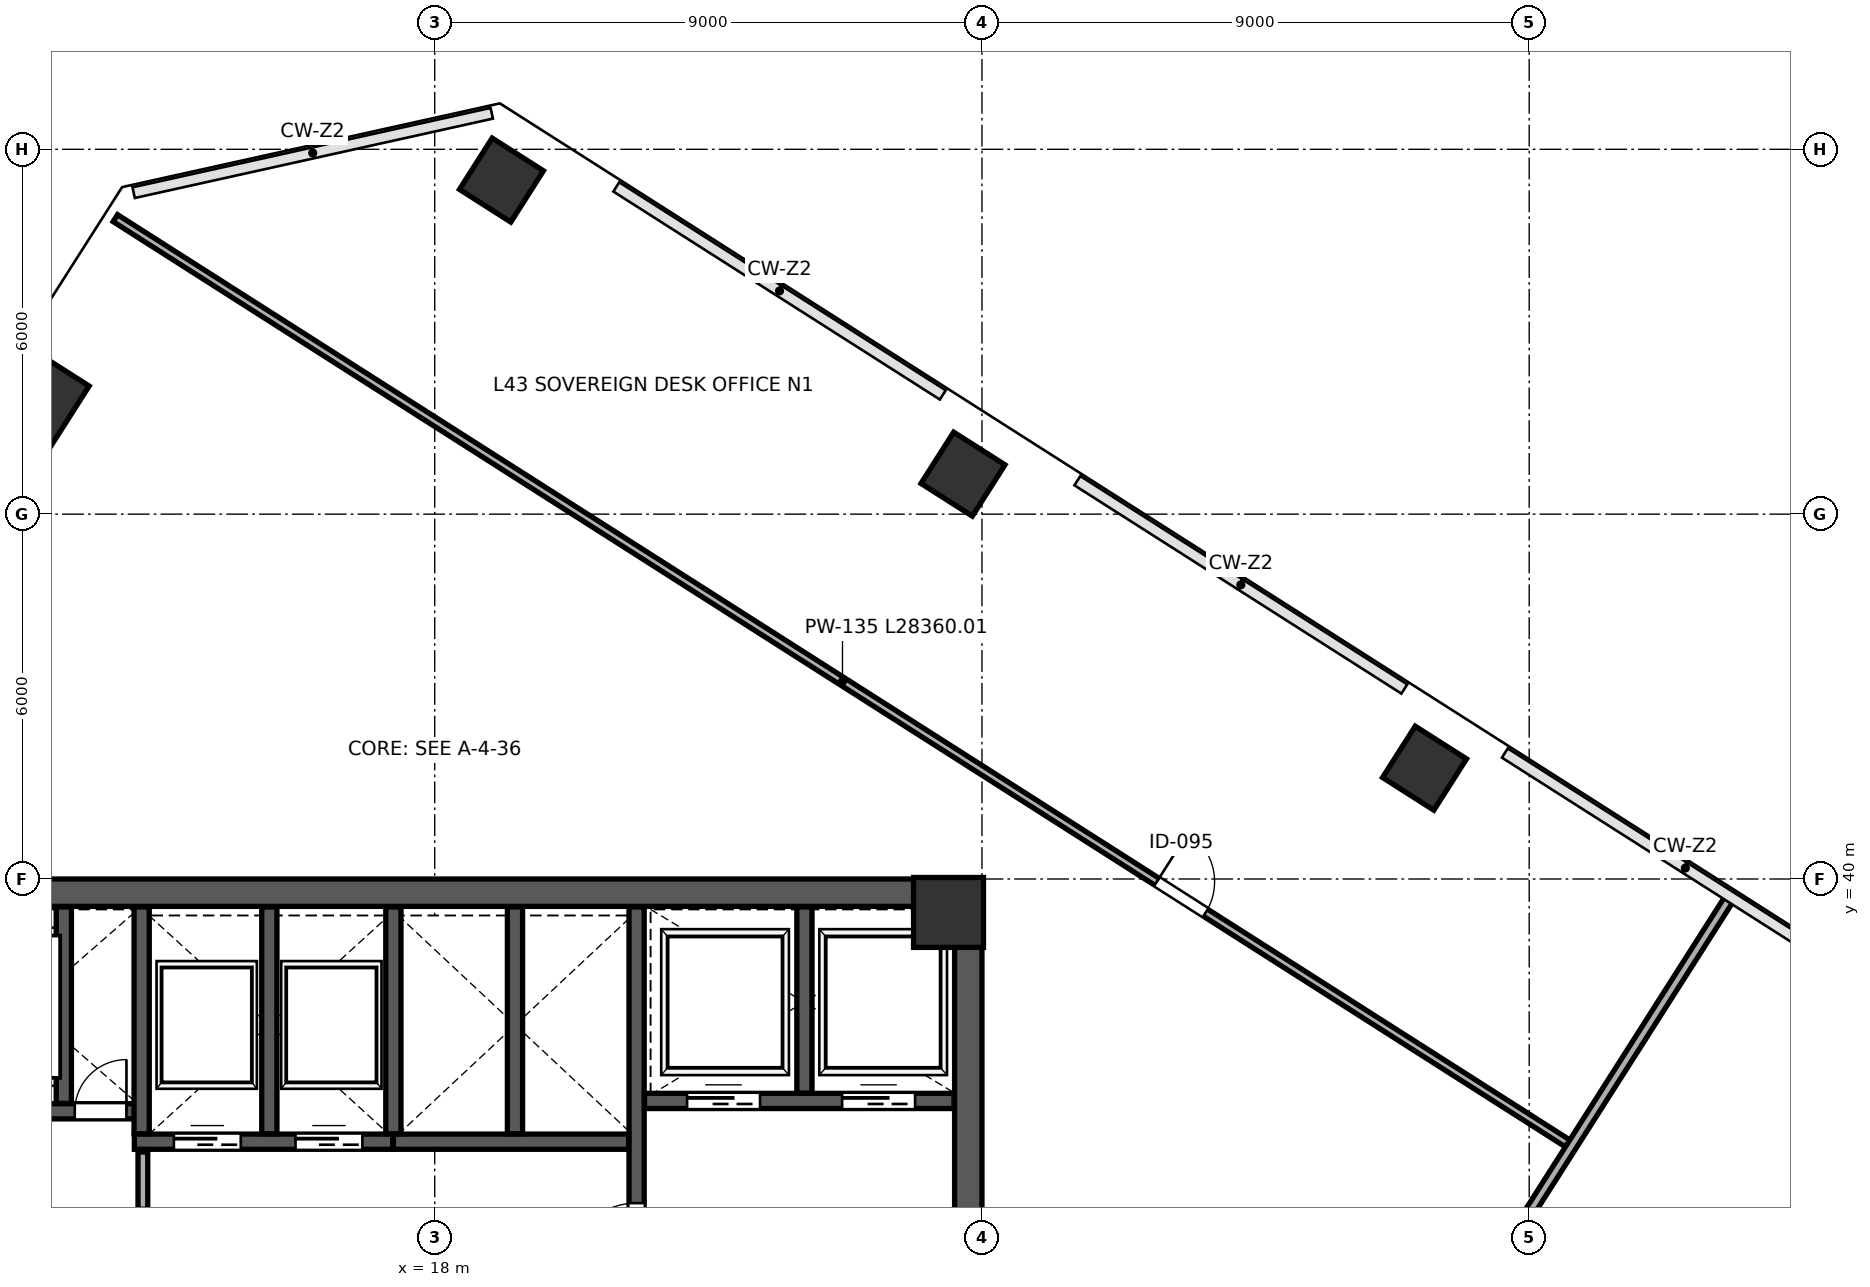
"""IFC4 building model, lengths in metres.
Left out: names, types, materials, properties, quantities, classifications, styles, units other than length and angle.
Written with IfcOpenShell. Run it as: python <this file> out.ifc"""

import sys

from ifc_helpers import new_model, si_unit, direction, frame, frame_2d, origin, origin_2d, place, context, subcontext, project, spatial, rectangle, extrude, clip, halfspace, source, transform, mapped, element, fill, save


model = new_model("IFC4")
c1 = context("Model", 3, precision=1e-05, world=origin(), true_north=direction((0.0, 1.0)))
c2 = subcontext(c1, "Body", "Model", "MODEL_VIEW")
j1 = project(units=[si_unit("LENGTHUNIT", "METRE"), si_unit("PLANEANGLEUNIT", "RADIAN")], contexts=[c1])
p1 = place(None, origin())
s1 = spatial("IfcSite", under=j1, at=p1, CompositionType="ELEMENT")
p2 = place(p1, origin())
s2 = spatial("IfcBuilding", under=s1, at=p2, CompositionType="ELEMENT")
p3 = place(p2, frame((0.0, 0.0, 191.8)))
s3 = spatial("IfcBuildingStorey", under=s2, at=p3, CompositionType="ELEMENT", Elevation=191.8)
m1 = source(origin(), c2, "Body", "SweptSolid", [
    extrude(rectangle(XDim=1.15, YDim=1.15, at=origin_2d()), origin(), (0.0, 0.0, 1.0), 4.198),
])
p4 = place(p3, frame((26.45, 39.45, 0.001), z_axis=(0.0, 0.0, 1.0), x_axis=(1.0, 0.0, 0.0)))
e1 = element("IfcColumn", 1, at=p4, inside=s3, PredefinedType="COLUMN", context=c2, shape_type="MappedRepresentation", body=[
    mapped(m1, transform((0.0, 0.0, 0.0), scale=1.0)),
])
p5 = place(p3, frame((19.098, 51.494, 0.0), z_axis=(0.198890629471, 0.020105496049, 0.979815434935), x_axis=(-0.438960395993, -0.892063444469, 0.107408481004)))
e2 = element("IfcColumn", 2, at=p5, inside=s3, PredefinedType="COLUMN", context=c2, shape_type="Clipping", body=[
    clip(clip(extrude(rectangle(XDim=1.0, YDim=1.0, at=origin_2d()), origin(), (0.0, 0.0, 1.0), 4.286), halfspace(frame((0.0, 0.0, 0.142), z_axis=(0.0, 0.0, -1.0), x_axis=(1.0, 0.0, 0.0)), False)), halfspace(frame((0.0, 0.0, 4.145), z_axis=(0.0, 0.0, 1.0), x_axis=(1.0, 0.0, 0.0)), False)),
])
p6 = place(p3, frame((26.688, 46.658, 0.0), z_axis=(0.14914476181, -0.05646727419, 0.98720174583), x_axis=(-0.794687285195, -0.600940867907, 0.085686591885)))
e3 = element("IfcColumn", 3, at=p6, inside=s3, PredefinedType="COLUMN", context=c2, shape_type="Clipping", body=[
    clip(clip(extrude(rectangle(XDim=1.0, YDim=1.0, at=origin_2d()), origin(), (0.0, 0.0, 1.0), 4.254), halfspace(frame((0.0, 0.0, 0.112), z_axis=(0.0, 0.0, -1.0), x_axis=(1.0, 0.0, 0.0)), False)), halfspace(frame((0.0, 0.0, 4.142), z_axis=(0.0, 0.0, 1.0), x_axis=(1.0, 0.0, 0.0)), False)),
])
p7 = place(p3, frame((34.279, 41.822, 0.0), z_axis=(0.09775031646, -0.133066559826, 0.986274893875), x_axis=(-0.993434538691, -0.072232782497, 0.088714387043)))
e4 = element("IfcColumn", 4, at=p7, inside=s3, PredefinedType="COLUMN", context=c2, shape_type="Clipping", body=[
    clip(clip(extrude(rectangle(XDim=1.0, YDim=1.0, at=origin_2d()), origin(), (0.0, 0.0, 1.0), 4.258), halfspace(frame((0.0, 0.0, 0.116), z_axis=(0.0, 0.0, -1.0), x_axis=(1.0, 0.0, 0.0)), False)), halfspace(frame((0.0, 0.0, 4.142), z_axis=(0.0, 0.0, 1.0), x_axis=(1.0, 0.0, 0.0)), False)),
])
p8 = place(p3, frame((11.587, 47.801, 0.0), z_axis=(0.163271900123, 0.097586490462, 0.981742921293), x_axis=(-0.020086457797, -0.994560936836, 0.102201160132)))
e5 = element("IfcColumn", 5, at=p8, inside=s3, PredefinedType="PILASTER", context=c2, shape_type="Clipping", body=[
    clip(clip(extrude(rectangle(XDim=0.9, YDim=1.3, at=origin_2d()), origin(), (0.0, 0.0, 1.0), 4.278), halfspace(frame((0.0, 0.0, 0.154), z_axis=(0.0, 0.0, -1.0), x_axis=(1.0, 0.0, 0.0)), False)), halfspace(frame((0.0, 0.0, 4.124), z_axis=(0.0, 0.0, 1.0), x_axis=(1.0, 0.0, 0.0)), False)),
])
p9 = place(p3, frame((26.775, 24.45, 0.0), z_axis=(0.0, 0.0, 1.0), x_axis=(0.0, 1.0, 0.0)))
e6 = element("IfcWall", 6, at=p9, inside=s3, PredefinedType="SHEAR", context=c2, shape_type="SweptSolid", body=[
    extrude(rectangle(XDim=15.1, YDim=0.45, at=frame_2d((7.55, 0.0))), origin(), (0.0, 0.0, 1.0), 3.96),
])
p10 = place(p9, frame((8.6, 0.0, 0.0)))
e7 = element("IfcOpeningElement", 7, at=p10, cuts=e6, PredefinedType="OPENING", context=c2, shape_type="SweptSolid", body=[
    extrude(rectangle(XDim=1.15, YDim=2.2, at=frame_2d((0.575, 1.1))), frame((0.0, 0.235, 0.0), z_axis=(0.0, -1.0, 0.0), x_axis=(1.0, 0.0, 0.0)), (0.0, 0.0, 1.0), 0.47),
])
p11 = place(p3, frame((9.0, 39.775, 0.0), z_axis=(0.0, 0.0, 1.0), x_axis=(1.0, 0.0, 0.0)))
e8 = element("IfcWall", 8, at=p11, inside=s3, PredefinedType="SHEAR", context=c2, shape_type="SweptSolid", body=[
    extrude(rectangle(XDim=18.0, YDim=0.45, at=frame_2d((9.0, 0.0))), origin(), (0.0, 0.0, 1.0), 3.96),
])
p12 = place(p3, frame((21.32, 32.12, 0.0), z_axis=(0.0, 0.0, 1.0), x_axis=(0.0, 1.0, 0.0)))
e9 = element("IfcWall", 9, at=p12, inside=s3, PredefinedType="SHEAR", context=c2, shape_type="SweptSolid", body=[
    extrude(rectangle(XDim=7.42, YDim=0.25, at=frame_2d((3.71, 0.0))), origin(), (0.0, 0.0, 1.0), 3.96),
])
p13 = place(p12, frame((1.4, 0.0, 0.0)))
e10 = element("IfcOpeningElement", 10, at=p13, cuts=e9, PredefinedType="OPENING", context=c2, shape_type="SweptSolid", body=[
    extrude(rectangle(XDim=1.15, YDim=2.2, at=frame_2d((0.575, 1.1))), frame((0.0, 0.135, 0.0), z_axis=(0.0, -1.0, 0.0), x_axis=(1.0, 0.0, 0.0)), (0.0, 0.0, 1.0), 0.27),
])
p14 = place(p3, frame((9.46, 36.18, 0.0), z_axis=(0.0, 0.0, 1.0), x_axis=(1.0, 0.0, 0.0)))
e11 = element("IfcWall", 11, at=p14, inside=s3, PredefinedType="SHEAR", context=c2, shape_type="SweptSolid", body=[
    extrude(rectangle(XDim=3.79, YDim=0.25, at=frame_2d((1.895, 0.0))), origin(), (0.0, 0.0, 1.0), 3.96),
])
p15 = place(p14, frame((2.62, 0.0, 0.0)))
e12 = element("IfcOpeningElement", 12, at=p15, cuts=e11, PredefinedType="OPENING", context=c2, shape_type="SweptSolid", body=[
    extrude(rectangle(XDim=0.85, YDim=2.1, at=frame_2d((0.425, 1.05))), frame((0.0, 0.135, 0.0), z_axis=(0.0, -1.0, 0.0), x_axis=(1.0, 0.0, 0.0)), (0.0, 0.0, 1.0), 0.27),
])
p16 = place(p14, frame((0.85, 0.0, 0.0)))
e13 = element("IfcOpeningElement", 13, at=p16, cuts=e11, PredefinedType="OPENING", context=c2, shape_type="SweptSolid", body=[
    extrude(rectangle(XDim=1.3, YDim=2.25, at=frame_2d((0.65, 1.125))), frame((0.0, 0.135, 0.0), z_axis=(0.0, -1.0, 0.0), x_axis=(1.0, 0.0, 0.0)), (0.0, 0.0, 1.0), 0.27),
])
p17 = place(p3, frame((11.9, 36.31, 0.0), z_axis=(0.0, 0.0, 1.0), x_axis=(0.0, 1.0, 0.0)))
e14 = element("IfcWall", 14, at=p17, inside=s3, PredefinedType="SHEAR", context=c2, shape_type="SweptSolid", body=[
    extrude(rectangle(XDim=3.23, YDim=0.25, at=frame_2d((1.615, 0.0))), origin(), (0.0, 0.0, 1.0), 3.96),
])
p18 = place(p3, frame((21.45, 36.35, 0.0), z_axis=(0.0, 0.0, 1.0), x_axis=(1.0, 0.0, 0.0)))
e15 = element("IfcWall", 15, at=p18, inside=s3, PredefinedType="SHEAR", context=c2, shape_type="SweptSolid", body=[
    extrude(rectangle(XDim=5.09, YDim=0.25, at=frame_2d((2.545, 0.0))), origin(), (0.0, 0.0, 1.0), 3.96),
])
p19 = place(p18, frame((0.7, 0.0, 0.0)))
e16 = element("IfcOpeningElement", 16, at=p19, cuts=e15, PredefinedType="OPENING", context=c2, shape_type="SweptSolid", body=[
    extrude(rectangle(XDim=1.2, YDim=2.2, at=frame_2d((0.6, 1.1))), frame((0.0, 0.135, 0.0), z_axis=(0.0, -1.0, 0.0), x_axis=(1.0, 0.0, 0.0)), (0.0, 0.0, 1.0), 0.27),
])
p20 = place(p18, frame((3.25, 0.0, 0.0)))
e17 = element("IfcOpeningElement", 17, at=p20, cuts=e15, PredefinedType="OPENING", context=c2, shape_type="SweptSolid", body=[
    extrude(rectangle(XDim=1.2, YDim=2.2, at=frame_2d((0.6, 1.1))), frame((0.0, 0.135, 0.0), z_axis=(0.0, -1.0, 0.0), x_axis=(1.0, 0.0, 0.0)), (0.0, 0.0, 1.0), 0.27),
])
p21 = place(p3, frame((24.08, 36.48, 0.0), z_axis=(0.0, 0.0, 1.0), x_axis=(0.0, 1.0, 0.0)))
e18 = element("IfcWall", 18, at=p21, inside=s3, PredefinedType="SHEAR", context=c2, shape_type="SweptSolid", body=[
    extrude(rectangle(XDim=3.06, YDim=0.25, at=frame_2d((1.53, 0.0))), origin(), (0.0, 0.0, 1.0), 3.96),
])
p22 = place(p3, frame((13.06, 35.68, 0.0), z_axis=(0.0, 0.0, 1.0), x_axis=(1.0, 0.0, 0.0)))
e19 = element("IfcWall", 19, at=p22, inside=s3, PredefinedType="SHEAR", context=c2, shape_type="SweptSolid", body=[
    extrude(rectangle(XDim=4.25, YDim=0.25, at=frame_2d((2.125, 0.0))), origin(), (0.0, 0.0, 1.0), 3.96),
])
p23 = place(p22, frame((0.65, 0.0, 0.0)))
e20 = element("IfcOpeningElement", 20, at=p23, cuts=e19, PredefinedType="OPENING", context=c2, shape_type="SweptSolid", body=[
    extrude(rectangle(XDim=1.1, YDim=2.2, at=frame_2d((0.55, 1.1))), frame((0.0, 0.135, 0.0), z_axis=(0.0, -1.0, 0.0), x_axis=(1.0, 0.0, 0.0)), (0.0, 0.0, 1.0), 0.27),
])
p24 = place(p22, frame((2.65, 0.0, 0.0)))
e21 = element("IfcOpeningElement", 21, at=p24, cuts=e19, PredefinedType="OPENING", context=c2, shape_type="SweptSolid", body=[
    extrude(rectangle(XDim=1.1, YDim=2.2, at=frame_2d((0.55, 1.1))), frame((0.0, 0.135, 0.0), z_axis=(0.0, -1.0, 0.0), x_axis=(1.0, 0.0, 0.0)), (0.0, 0.0, 1.0), 0.27),
])
for number, where, z_axis, x_axis in (
    (22, (13.18, 35.81, 0.0), (0.0, 0.0, 1.0), (0.0, 1.0, 0.0)),
    (23, (15.28, 35.81, 0.0), (0.0, 0.0, 1.0), (0.0, 1.0, 0.0)),
):
    element("IfcWall", number, at=place(p3, frame(where, z_axis=z_axis, x_axis=x_axis)), inside=s3, PredefinedType="SHEAR", context=c2, shape_type="SweptSolid", body=[
        extrude(rectangle(XDim=3.73, YDim=0.25, at=frame_2d((1.865, 0.0))), origin(), (0.0, 0.0, 1.0), 3.96),
    ])
p25 = place(p3, frame((17.32, 35.68, 0.0), z_axis=(0.0, 0.0, 1.0), x_axis=(1.0, 0.0, 0.0)))
e24 = element("IfcWall", 24, at=p25, inside=s3, PredefinedType="SHEAR", context=c2, shape_type="SweptSolid", body=[
    extrude(rectangle(XDim=3.87, YDim=0.25, at=frame_2d((1.935, 0.0))), origin(), (0.0, 0.0, 1.0), 3.96),
])
for number, where, z_axis, x_axis in (
    (25, (17.32, 35.81, 0.0), (0.0, 0.0, 1.0), (0.0, 1.0, 0.0)),
    (26, (19.32, 35.81, 0.0), (0.0, 0.0, 1.0), (0.0, 1.0, 0.0)),
):
    element("IfcWall", number, at=place(p3, frame(where, z_axis=z_axis, x_axis=x_axis)), inside=s3, PredefinedType="SHEAR", context=c2, shape_type="SweptSolid", body=[
        extrude(rectangle(XDim=3.73, YDim=0.25, at=frame_2d((1.865, 0.0))), origin(), (0.0, 0.0, 1.0), 3.96),
    ])
p26 = place(p3, frame((13.2, 34.57, 0.0), z_axis=(0.0, 0.0, 1.0), x_axis=(0.0, 1.0, 0.0)))
e27 = element("IfcWall", 27, at=p26, inside=s3, PredefinedType="PARTITIONING", context=c2, shape_type="SweptSolid", body=[
    extrude(rectangle(XDim=0.94, YDim=0.16, at=frame_2d((0.47, 0.0))), origin(), (0.0, 0.0, 1.0), 3.96),
])
p27 = place(p3, frame((12.747, 50.868, 0.0), z_axis=(0.0, 0.0, 1.0), x_axis=(0.843393047262, -0.537297094567, 0.0)))
e28 = element("IfcWall", 28, at=p27, inside=s3, PredefinedType="PARTITIONING", context=c2, shape_type="SweptSolid", body=[
    extrude(rectangle(XDim=28.36, YDim=0.135, at=frame_2d((14.18, 0.0))), origin(), (0.0, 0.0, 1.0), 3.96),
])
p28 = place(p27, frame((20.31, 0.0, 0.0)))
e29 = element("IfcOpeningElement", 29, at=p28, cuts=e28, PredefinedType="OPENING", context=c2, shape_type="SweptSolid", body=[
    extrude(rectangle(XDim=0.95, YDim=2.15, at=frame_2d((0.475, 1.075))), frame((0.0, 0.078, 0.0), z_axis=(0.0, -1.0, 0.0), x_axis=(1.0, 0.0, 0.0)), (0.0, 0.0, 1.0), 0.155),
])
p29 = place(p3, frame((29.698, 24.619, 0.0), z_axis=(0.0, 0.0, 1.0), x_axis=(0.537299578138, 0.843391465058, 0.0)))
e30 = element("IfcWall", 30, at=p29, inside=s3, PredefinedType="PARTITIONING", context=c2, shape_type="SweptSolid", body=[
    extrude(rectangle(XDim=17.84, YDim=0.16, at=frame_2d((8.92, 0.0))), origin(), (0.0, 0.0, 1.0), 3.195),
])
m2 = source(origin(), c2, "Body", "SweptSolid", [
    extrude(rectangle(XDim=1.15, YDim=2.2, at=frame_2d((0.575, 1.1))), frame((0.0, 0.025, 0.0), z_axis=(0.0, -1.0, 0.0), x_axis=(1.0, 0.0, 0.0)), (0.0, 0.0, 1.0), 0.05),
])
p30 = place(p13, origin())
e31 = element("IfcDoor", 31, at=p30, inside=s3, OperationType="SINGLE_SWING_LEFT", PredefinedType="DOOR", context=c2, shape_type="MappedRepresentation", body=[
    mapped(m2, transform((0.0, 0.0, 0.0), scale=1.0)),
])
fill(e10, e31)
m3 = source(origin(), c2, "Body", "SweptSolid", [
    extrude(rectangle(XDim=0.85, YDim=2.1, at=frame_2d((0.425, 1.05))), frame((0.0, 0.025, 0.0), z_axis=(0.0, -1.0, 0.0), x_axis=(1.0, 0.0, 0.0)), (0.0, 0.0, 1.0), 0.05),
])
p31 = place(p15, origin())
e32 = element("IfcDoor", 32, at=p31, inside=s3, OperationType="SINGLE_SWING_RIGHT", PredefinedType="DOOR", context=c2, shape_type="MappedRepresentation", body=[
    mapped(m3, transform((0.0, 0.0, 0.0), scale=1.0)),
])
fill(e12, e32)
m4 = source(origin(), c2, "Body", "SweptSolid", [
    extrude(rectangle(XDim=1.1, YDim=2.2, at=frame_2d((0.55, 1.1))), frame((0.0, 0.025, 0.0), z_axis=(0.0, -1.0, 0.0), x_axis=(1.0, 0.0, 0.0)), (0.0, 0.0, 1.0), 0.05),
])
p32 = place(p23, origin())
e33 = element("IfcDoor", 33, at=p32, inside=s3, OperationType="SLIDING_TO_LEFT", PredefinedType="DOOR", context=c2, shape_type="MappedRepresentation", body=[
    mapped(m4, transform((0.0, 0.0, 0.0), scale=1.0)),
])
fill(e20, e33)
p33 = place(p24, origin())
e34 = element("IfcDoor", 34, at=p33, inside=s3, OperationType="SLIDING_TO_RIGHT", PredefinedType="DOOR", context=c2, shape_type="MappedRepresentation", body=[
    mapped(m4, transform((0.0, 0.0, 0.0), scale=1.0)),
])
fill(e21, e34)
m5 = source(origin(), c2, "Body", "SweptSolid", [
    extrude(rectangle(XDim=1.2, YDim=2.2, at=frame_2d((0.6, 1.1))), frame((0.0, 0.025, 0.0), z_axis=(0.0, -1.0, 0.0), x_axis=(1.0, 0.0, 0.0)), (0.0, 0.0, 1.0), 0.05),
])
p34 = place(p19, origin())
e35 = element("IfcDoor", 35, at=p34, inside=s3, OperationType="SLIDING_TO_LEFT", PredefinedType="DOOR", context=c2, shape_type="MappedRepresentation", body=[
    mapped(m5, transform((0.0, 0.0, 0.0), scale=1.0)),
])
fill(e16, e35)
p35 = place(p20, origin())
e36 = element("IfcDoor", 36, at=p35, inside=s3, OperationType="SLIDING_TO_RIGHT", PredefinedType="DOOR", context=c2, shape_type="MappedRepresentation", body=[
    mapped(m5, transform((0.0, 0.0, 0.0), scale=1.0)),
])
fill(e17, e36)
m6 = source(origin(), c2, "Body", "SweptSolid", [
    extrude(rectangle(XDim=0.95, YDim=2.15, at=frame_2d((0.475, 1.075))), frame((0.0, 0.025, 0.0), z_axis=(0.0, -1.0, 0.0), x_axis=(1.0, 0.0, 0.0)), (0.0, 0.0, 1.0), 0.05),
])
p36 = place(p28, origin())
e37 = element("IfcDoor", 37, at=p36, inside=s3, OperationType="SINGLE_SWING_LEFT", PredefinedType="DOOR", context=c2, shape_type="MappedRepresentation", body=[
    mapped(m6, transform((0.0, 0.0, 0.0), scale=1.0)),
])
fill(e29, e37)
save(model, sys.argv[1])
